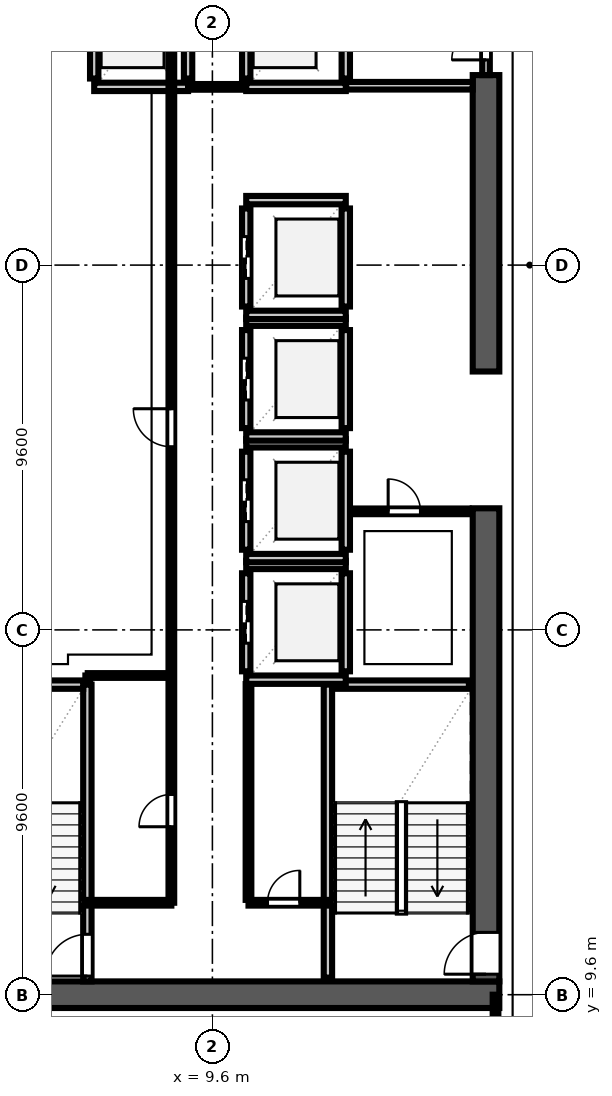
"""IFC4 building model, lengths in metres.
Left out: names, types, materials, properties, quantities, classifications, styles, units other than length and angle.
Written with IfcOpenShell. Run it as: python <this file> out.ifc"""

import sys

from ifc_helpers import new_model, si_unit, direction, frame, frame_2d, origin, place, context, subcontext, project, spatial, rectangle, extrude, element, fill, save


model = new_model("IFC4")
c1 = context("Model", 3, precision=1e-05, world=origin(), true_north=direction((0.0, 1.0)))
c2 = subcontext(c1, "Body", "Model", "MODEL_VIEW")
j1 = project(units=[si_unit("LENGTHUNIT", "METRE"), si_unit("PLANEANGLEUNIT", "RADIAN")], contexts=[c1])
p1 = place(None, origin())
s1 = spatial("IfcSite", under=j1, at=p1, CompositionType="ELEMENT")
p2 = place(p1, origin())
s2 = spatial("IfcBuilding", under=s1, at=p2, CompositionType="ELEMENT")
p3 = place(p2, frame((0.0, 0.0, 163.6)))
s3 = spatial("IfcBuildingStorey", under=s2, at=p3, CompositionType="ELEMENT", Elevation=163.6)
p4 = place(p3, frame((2.55, 9.6, 0.0), z_axis=(0.0, 0.0, 1.0), x_axis=(1.0, 0.0, 0.0)))
e1 = element("IfcWall", 1, at=p4, inside=s3, PredefinedType="SHEAR", context=c2, shape_type="SweptSolid", body=[
    extrude(rectangle(XDim=14.6, YDim=0.7, at=frame_2d((7.3, 0.0))), origin(), (0.0, 0.0, 1.0), 3.54),
])
p5 = place(p3, frame((16.8, 9.95, 0.0), z_axis=(0.0, 0.0, 1.0), x_axis=(0.0, 1.0, 0.0)))
e2 = element("IfcWall", 2, at=p5, inside=s3, PredefinedType="SHEAR", context=c2, shape_type="SweptSolid", body=[
    extrude(rectangle(XDim=12.45, YDim=0.7, at=frame_2d((6.225, 0.0))), origin(), (0.0, 0.0, 1.0), 3.54),
])
p6 = place(p5, frame((0.19, 0.0, 0.0)))
e3 = element("IfcOpeningElement", 3, at=p6, cuts=e2, PredefinedType="OPENING", context=c2, shape_type="SweptSolid", body=[
    extrude(rectangle(XDim=1.1, YDim=2.2, at=frame_2d((0.55, 1.1))), frame((0.0, 0.362, 0.0), z_axis=(0.0, -1.0, 0.0), x_axis=(1.0, 0.0, 0.0)), (0.0, 0.0, 1.0), 0.724),
])
p7 = place(p3, frame((16.8, 26.0, 0.0), z_axis=(0.0, 0.0, 1.0), x_axis=(0.0, 1.0, 0.0)))
e4 = element("IfcWall", 4, at=p7, inside=s3, PredefinedType="SHEAR", context=c2, shape_type="SweptSolid", body=[
    extrude(rectangle(XDim=7.8, YDim=0.7, at=frame_2d((3.9, 0.0))), origin(), (0.0, 0.0, 1.0), 3.54),
])
p8 = place(p3, frame((6.31, 9.95, 0.0), z_axis=(0.0, 0.0, 1.0), x_axis=(0.0, 1.0, 0.0)))
e5 = element("IfcWall", 5, at=p8, inside=s3, PredefinedType="SOLIDWALL", context=c2, shape_type="SweptSolid", body=[
    extrude(rectangle(XDim=7.81, YDim=0.22, at=frame_2d((3.905, 0.0))), origin(), (0.0, 0.0, 1.0), 3.54),
])
p9 = place(p8, frame((0.14, 0.0, 0.0)))
e6 = element("IfcOpeningElement", 6, at=p9, cuts=e5, PredefinedType="OPENING", context=c2, shape_type="SweptSolid", body=[
    extrude(rectangle(XDim=1.1, YDim=2.2, at=frame_2d((0.55, 1.1))), frame((0.0, 0.122, 0.0), z_axis=(0.0, -1.0, 0.0), x_axis=(1.0, 0.0, 0.0)), (0.0, 0.0, 1.0), 0.244),
])
p10 = place(p3, frame((2.65, 17.76, 0.0), z_axis=(0.0, 0.0, 1.0), x_axis=(1.0, 0.0, 0.0)))
e7 = element("IfcWall", 7, at=p10, inside=s3, PredefinedType="SOLIDWALL", context=c2, shape_type="SweptSolid", body=[
    extrude(rectangle(XDim=3.55, YDim=0.22, at=frame_2d((1.775, 0.0))), origin(), (0.0, 0.0, 1.0), 3.54),
])
p11 = place(p3, frame((12.64, 10.05, 0.0), z_axis=(0.0, 0.0, 1.0), x_axis=(0.0, 1.0, 0.0)))
e8 = element("IfcWall", 8, at=p11, inside=s3, PredefinedType="SOLIDWALL", context=c2, shape_type="SweptSolid", body=[
    extrude(rectangle(XDim=7.71, YDim=0.22, at=frame_2d((3.855, 0.0))), origin(), (0.0, 0.0, 1.0), 3.54),
])
p12 = place(p3, frame((12.75, 17.76, 0.0), z_axis=(0.0, 0.0, 1.0), x_axis=(1.0, 0.0, 0.0)))
e9 = element("IfcWall", 9, at=p12, inside=s3, PredefinedType="SOLIDWALL", context=c2, shape_type="SweptSolid", body=[
    extrude(rectangle(XDim=3.6, YDim=0.22, at=frame_2d((1.8, 0.0))), origin(), (0.0, 0.0, 1.0), 3.54),
])
p13 = place(p3, frame((10.49, 18.11, 0.0), z_axis=(0.0, 0.0, 1.0), x_axis=(0.0, 1.0, 0.0)))
e10 = element("IfcWall", 10, at=p13, inside=s3, PredefinedType="SOLIDWALL", context=c2, shape_type="SweptSolid", body=[
    extrude(rectangle(XDim=2.58, YDim=0.22, at=frame_2d((1.29, 0.0))), origin(), (0.0, 0.0, 1.0), 3.54),
])
p14 = place(p13, frame((0.74, 0.0, 0.0)))
e11 = element("IfcOpeningElement", 11, at=p14, cuts=e10, PredefinedType="OPENING", context=c2, shape_type="SweptSolid", body=[
    extrude(rectangle(XDim=1.1, YDim=2.2, at=frame_2d((0.55, 1.1))), frame((0.0, 0.122, 0.0), z_axis=(0.0, -1.0, 0.0), x_axis=(1.0, 0.0, 0.0)), (0.0, 0.0, 1.0), 0.244),
])
p15 = place(p3, frame((13.11, 18.11, 0.0), z_axis=(0.0, 0.0, 1.0), x_axis=(0.0, 1.0, 0.0)))
e12 = element("IfcWall", 12, at=p15, inside=s3, PredefinedType="SOLIDWALL", context=c2, shape_type="SweptSolid", body=[
    extrude(rectangle(XDim=2.58, YDim=0.22, at=frame_2d((1.29, 0.0))), origin(), (0.0, 0.0, 1.0), 3.54),
])
for number, where, z_axis, x_axis in (
    (13, (10.49, 17.89, 0.0), (0.0, 0.0, 1.0), (1.0, 0.0, 0.0)),
    (14, (10.49, 20.91, 0.0), (0.0, 0.0, 1.0), (1.0, 0.0, 0.0)),
):
    element("IfcWall", number, at=place(p3, frame(where, z_axis=z_axis, x_axis=x_axis)), inside=s3, PredefinedType="SOLIDWALL", context=c2, shape_type="SweptSolid", body=[
        extrude(rectangle(XDim=2.62, YDim=0.22, at=frame_2d((1.31, 0.0))), origin(), (0.0, 0.0, 1.0), 3.54),
    ])
p16 = place(p3, frame((10.49, 21.31, 0.0), z_axis=(0.0, 0.0, 1.0), x_axis=(0.0, 1.0, 0.0)))
e15 = element("IfcWall", 15, at=p16, inside=s3, PredefinedType="SOLIDWALL", context=c2, shape_type="SweptSolid", body=[
    extrude(rectangle(XDim=2.58, YDim=0.22, at=frame_2d((1.29, 0.0))), origin(), (0.0, 0.0, 1.0), 3.54),
])
p17 = place(p16, frame((0.74, 0.0, 0.0)))
e16 = element("IfcOpeningElement", 16, at=p17, cuts=e15, PredefinedType="OPENING", context=c2, shape_type="SweptSolid", body=[
    extrude(rectangle(XDim=1.1, YDim=2.2, at=frame_2d((0.55, 1.1))), frame((0.0, 0.122, 0.0), z_axis=(0.0, -1.0, 0.0), x_axis=(1.0, 0.0, 0.0)), (0.0, 0.0, 1.0), 0.244),
])
p18 = place(p3, frame((13.11, 21.31, 0.0), z_axis=(0.0, 0.0, 1.0), x_axis=(0.0, 1.0, 0.0)))
e17 = element("IfcWall", 17, at=p18, inside=s3, PredefinedType="SOLIDWALL", context=c2, shape_type="SweptSolid", body=[
    extrude(rectangle(XDim=2.58, YDim=0.22, at=frame_2d((1.29, 0.0))), origin(), (0.0, 0.0, 1.0), 3.54),
])
for number, where, z_axis, x_axis in (
    (18, (10.49, 21.09, 0.0), (0.0, 0.0, 1.0), (1.0, 0.0, 0.0)),
    (19, (10.49, 24.11, 0.0), (0.0, 0.0, 1.0), (1.0, 0.0, 0.0)),
):
    element("IfcWall", number, at=place(p3, frame(where, z_axis=z_axis, x_axis=x_axis)), inside=s3, PredefinedType="SOLIDWALL", context=c2, shape_type="SweptSolid", body=[
        extrude(rectangle(XDim=2.62, YDim=0.22, at=frame_2d((1.31, 0.0))), origin(), (0.0, 0.0, 1.0), 3.54),
    ])
p19 = place(p3, frame((10.49, 24.51, 0.0), z_axis=(0.0, 0.0, 1.0), x_axis=(0.0, 1.0, 0.0)))
e20 = element("IfcWall", 20, at=p19, inside=s3, PredefinedType="SOLIDWALL", context=c2, shape_type="SweptSolid", body=[
    extrude(rectangle(XDim=2.58, YDim=0.22, at=frame_2d((1.29, 0.0))), origin(), (0.0, 0.0, 1.0), 3.54),
])
p20 = place(p19, frame((0.74, 0.0, 0.0)))
e21 = element("IfcOpeningElement", 21, at=p20, cuts=e20, PredefinedType="OPENING", context=c2, shape_type="SweptSolid", body=[
    extrude(rectangle(XDim=1.1, YDim=2.2, at=frame_2d((0.55, 1.1))), frame((0.0, 0.122, 0.0), z_axis=(0.0, -1.0, 0.0), x_axis=(1.0, 0.0, 0.0)), (0.0, 0.0, 1.0), 0.244),
])
p21 = place(p3, frame((13.11, 24.51, 0.0), z_axis=(0.0, 0.0, 1.0), x_axis=(0.0, 1.0, 0.0)))
e22 = element("IfcWall", 22, at=p21, inside=s3, PredefinedType="SOLIDWALL", context=c2, shape_type="SweptSolid", body=[
    extrude(rectangle(XDim=2.58, YDim=0.22, at=frame_2d((1.29, 0.0))), origin(), (0.0, 0.0, 1.0), 3.54),
])
for number, where, z_axis, x_axis in (
    (23, (10.49, 24.29, 0.0), (0.0, 0.0, 1.0), (1.0, 0.0, 0.0)),
    (24, (10.49, 27.31, 0.0), (0.0, 0.0, 1.0), (1.0, 0.0, 0.0)),
):
    element("IfcWall", number, at=place(p3, frame(where, z_axis=z_axis, x_axis=x_axis)), inside=s3, PredefinedType="SOLIDWALL", context=c2, shape_type="SweptSolid", body=[
        extrude(rectangle(XDim=2.62, YDim=0.22, at=frame_2d((1.31, 0.0))), origin(), (0.0, 0.0, 1.0), 3.54),
    ])
p22 = place(p3, frame((10.49, 27.71, 0.0), z_axis=(0.0, 0.0, 1.0), x_axis=(0.0, 1.0, 0.0)))
e25 = element("IfcWall", 25, at=p22, inside=s3, PredefinedType="SOLIDWALL", context=c2, shape_type="SweptSolid", body=[
    extrude(rectangle(XDim=2.58, YDim=0.22, at=frame_2d((1.29, 0.0))), origin(), (0.0, 0.0, 1.0), 3.54),
])
p23 = place(p22, frame((0.74, 0.0, 0.0)))
e26 = element("IfcOpeningElement", 26, at=p23, cuts=e25, PredefinedType="OPENING", context=c2, shape_type="SweptSolid", body=[
    extrude(rectangle(XDim=1.1, YDim=2.2, at=frame_2d((0.55, 1.1))), frame((0.0, 0.122, 0.0), z_axis=(0.0, -1.0, 0.0), x_axis=(1.0, 0.0, 0.0)), (0.0, 0.0, 1.0), 0.244),
])
p24 = place(p3, frame((13.11, 27.71, 0.0), z_axis=(0.0, 0.0, 1.0), x_axis=(0.0, 1.0, 0.0)))
e27 = element("IfcWall", 27, at=p24, inside=s3, PredefinedType="SOLIDWALL", context=c2, shape_type="SweptSolid", body=[
    extrude(rectangle(XDim=2.58, YDim=0.22, at=frame_2d((1.29, 0.0))), origin(), (0.0, 0.0, 1.0), 3.54),
])
for number, where, z_axis, x_axis in (
    (28, (10.49, 27.49, 0.0), (0.0, 0.0, 1.0), (1.0, 0.0, 0.0)),
    (29, (10.49, 30.51, 0.0), (0.0, 0.0, 1.0), (1.0, 0.0, 0.0)),
):
    element("IfcWall", number, at=place(p3, frame(where, z_axis=z_axis, x_axis=x_axis)), inside=s3, PredefinedType="SOLIDWALL", context=c2, shape_type="SweptSolid", body=[
        extrude(rectangle(XDim=2.62, YDim=0.22, at=frame_2d((1.31, 0.0))), origin(), (0.0, 0.0, 1.0), 3.54),
    ])
for number, where, z_axis, x_axis in (
    (30, (6.49, 33.71, 0.0), (0.0, 0.0, 1.0), (0.0, 1.0, 0.0)),
    (31, (8.96, 33.71, 0.0), (0.0, 0.0, 1.0), (0.0, 1.0, 0.0)),
):
    element("IfcWall", number, at=place(p3, frame(where, z_axis=z_axis, x_axis=x_axis)), inside=s3, PredefinedType="SOLIDWALL", context=c2, shape_type="SweptSolid", body=[
        extrude(rectangle(XDim=2.78, YDim=0.22, at=frame_2d((1.39, 0.0))), origin(), (0.0, 0.0, 1.0), 3.54),
    ])
p25 = place(p3, frame((6.49, 33.49, 0.0), z_axis=(0.0, 0.0, 1.0), x_axis=(1.0, 0.0, 0.0)))
e32 = element("IfcWall", 32, at=p25, inside=s3, PredefinedType="SOLIDWALL", context=c2, shape_type="SweptSolid", body=[
    extrude(rectangle(XDim=2.47, YDim=0.22, at=frame_2d((1.235, 0.0))), origin(), (0.0, 0.0, 1.0), 3.54),
])
for number, where, z_axis, x_axis in (
    (33, (10.49, 33.71, 0.0), (0.0, 0.0, 1.0), (0.0, 1.0, 0.0)),
    (34, (13.11, 33.71, 0.0), (0.0, 0.0, 1.0), (0.0, 1.0, 0.0)),
):
    element("IfcWall", number, at=place(p3, frame(where, z_axis=z_axis, x_axis=x_axis)), inside=s3, PredefinedType="SOLIDWALL", context=c2, shape_type="SweptSolid", body=[
        extrude(rectangle(XDim=2.78, YDim=0.22, at=frame_2d((1.39, 0.0))), origin(), (0.0, 0.0, 1.0), 3.54),
    ])
p26 = place(p3, frame((10.49, 33.49, 0.0), z_axis=(0.0, 0.0, 1.0), x_axis=(1.0, 0.0, 0.0)))
e35 = element("IfcWall", 35, at=p26, inside=s3, PredefinedType="SOLIDWALL", context=c2, shape_type="SweptSolid", body=[
    extrude(rectangle(XDim=2.62, YDim=0.22, at=frame_2d((1.31, 0.0))), origin(), (0.0, 0.0, 1.0), 3.54),
])
p27 = place(p3, frame((13.12, 33.52, 0.0), z_axis=(0.0, 0.0, 1.0), x_axis=(1.0, 0.0, 0.0)))
e36 = element("IfcWall", 36, at=p27, inside=s3, PredefinedType="SOLIDWALL", context=c2, shape_type="SweptSolid", body=[
    extrude(rectangle(XDim=3.33, YDim=0.2, at=frame_2d((1.665, 0.0))), origin(), (0.0, 0.0, 1.0), 3.54),
])
p28 = place(p3, frame((16.8, 33.8, 0.0), z_axis=(0.0, 0.0, 1.0), x_axis=(0.0, 1.0, 0.0)))
e37 = element("IfcWall", 37, at=p28, inside=s3, PredefinedType="SOLIDWALL", context=c2, shape_type="SweptSolid", body=[
    extrude(rectangle(XDim=2.6, YDim=0.2, at=frame_2d((1.3, 0.0))), origin(), (0.0, 0.0, 1.0), 3.54),
])
p29 = place(p28, frame((0.4, 0.0, 0.0)))
e38 = element("IfcOpeningElement", 38, at=p29, cuts=e37, PredefinedType="OPENING", context=c2, shape_type="SweptSolid", body=[
    extrude(rectangle(XDim=1.8, YDim=2.2, at=frame_2d((0.9, 1.1))), frame((0.0, 0.112, 0.0), z_axis=(0.0, -1.0, 0.0), x_axis=(1.0, 0.0, 0.0)), (0.0, 0.0, 1.0), 0.224),
])
p30 = place(p3, frame((8.965, 33.49, 0.0), z_axis=(0.0, 0.0, 1.0), x_axis=(1.0, 0.0, 0.0)))
e39 = element("IfcWall", 39, at=p30, inside=s3, PredefinedType="PARTITIONING", context=c2, shape_type="SweptSolid", body=[
    extrude(rectangle(XDim=1.52, YDim=0.15, at=frame_2d((0.76, 0.0))), origin(), (0.0, 0.0, 1.0), 3.54),
])
p31 = place(p3, frame((10.55, 12.02, 0.0), z_axis=(0.0, 0.0, 1.0), x_axis=(1.0, 0.0, 0.0)))
e40 = element("IfcWall", 40, at=p31, inside=s3, PredefinedType="PARTITIONING", context=c2, shape_type="SweptSolid", body=[
    extrude(rectangle(XDim=2.08, YDim=0.15, at=frame_2d((1.04, 0.0))), origin(), (0.0, 0.0, 1.0), 3.54),
])
p32 = place(p31, frame((0.5, 0.0, 0.0)))
e41 = element("IfcOpeningElement", 41, at=p32, cuts=e40, PredefinedType="OPENING", context=c2, shape_type="SweptSolid", body=[
    extrude(rectangle(XDim=0.85, YDim=2.1, at=frame_2d((0.425, 1.05))), frame((0.0, 0.087, 0.0), z_axis=(0.0, -1.0, 0.0), x_axis=(1.0, 0.0, 0.0)), (0.0, 0.0, 1.0), 0.174),
])
p33 = place(p3, frame((10.55, 12.095, 0.0), z_axis=(0.0, 0.0, 1.0), x_axis=(0.0, 1.0, 0.0)))
e42 = element("IfcWall", 42, at=p33, inside=s3, PredefinedType="PARTITIONING", context=c2, shape_type="SweptSolid", body=[
    extrude(rectangle(XDim=5.68, YDim=0.15, at=frame_2d((2.84, 0.0))), origin(), (0.0, 0.0, 1.0), 3.54),
])
p34 = place(p3, frame((13.225, 22.32, 0.0), z_axis=(0.0, 0.0, 1.0), x_axis=(1.0, 0.0, 0.0)))
e43 = element("IfcWall", 43, at=p34, inside=s3, PredefinedType="PARTITIONING", context=c2, shape_type="SweptSolid", body=[
    extrude(rectangle(XDim=3.12, YDim=0.15, at=frame_2d((1.56, 0.0))), origin(), (0.0, 0.0, 1.0), 3.54),
])
p35 = place(p34, frame((1.0, 0.0, 0.0)))
e44 = element("IfcOpeningElement", 44, at=p35, cuts=e43, PredefinedType="OPENING", context=c2, shape_type="SweptSolid", body=[
    extrude(rectangle(XDim=0.85, YDim=2.1, at=frame_2d((0.425, 1.05))), frame((0.0, 0.087, 0.0), z_axis=(0.0, -1.0, 0.0), x_axis=(1.0, 0.0, 0.0)), (0.0, 0.0, 1.0), 0.174),
])
p36 = place(p3, frame((6.32, 12.02, 0.0), z_axis=(0.0, 0.0, 1.0), x_axis=(1.0, 0.0, 0.0)))
e45 = element("IfcWall", 45, at=p36, inside=s3, PredefinedType="PARTITIONING", context=c2, shape_type="SweptSolid", body=[
    extrude(rectangle(XDim=2.2, YDim=0.15, at=frame_2d((1.1, 0.0))), origin(), (0.0, 0.0, 1.0), 3.54),
])
p37 = place(p3, frame((6.32, 17.8, 0.0), z_axis=(0.0, 0.0, 1.0), x_axis=(0.0, 1.0, 0.0)))
e46 = element("IfcWall", 46, at=p37, inside=s3, PredefinedType="PARTITIONING", context=c2, shape_type="SweptSolid", body=[
    extrude(rectangle(XDim=0.2, YDim=0.125, at=frame_2d((0.1, 0.0))), origin(), (0.0, 0.0, 1.0), 3.54),
])
p38 = place(p3, frame((6.32, 18.0, 0.0), z_axis=(0.0, 0.0, 1.0), x_axis=(1.0, 0.0, 0.0)))
e47 = element("IfcWall", 47, at=p38, inside=s3, PredefinedType="PARTITIONING", context=c2, shape_type="SweptSolid", body=[
    extrude(rectangle(XDim=2.2, YDim=0.125, at=frame_2d((1.1, 0.0))), origin(), (0.0, 0.0, 1.0), 3.54),
])
p39 = place(p3, frame((8.52, 12.02, 0.0), z_axis=(0.0, 0.0, 1.0), x_axis=(0.0, 1.0, 0.0)))
e48 = element("IfcWall", 48, at=p39, inside=s3, PredefinedType="PARTITIONING", context=c2, shape_type="SweptSolid", body=[
    extrude(rectangle(XDim=24.76, YDim=0.15, at=frame_2d((12.38, 0.0))), origin(), (0.0, 0.0, 1.0), 3.54),
])
p40 = place(p39, frame((2.0, 0.0, 0.0)))
e49 = element("IfcOpeningElement", 49, at=p40, cuts=e48, PredefinedType="OPENING", context=c2, shape_type="SweptSolid", body=[
    extrude(rectangle(XDim=0.85, YDim=2.1, at=frame_2d((0.425, 1.05))), frame((0.0, 0.087, 0.0), z_axis=(0.0, -1.0, 0.0), x_axis=(1.0, 0.0, 0.0)), (0.0, 0.0, 1.0), 0.174),
])
p41 = place(p39, frame((12.0, 0.0, 0.0)))
e50 = element("IfcOpeningElement", 50, at=p41, cuts=e48, PredefinedType="OPENING", context=c2, shape_type="SweptSolid", body=[
    extrude(rectangle(XDim=1.0, YDim=2.2, at=frame_2d((0.5, 1.1))), frame((0.0, 0.087, 0.0), z_axis=(0.0, -1.0, 0.0), x_axis=(1.0, 0.0, 0.0)), (0.0, 0.0, 1.0), 0.174),
])
p42 = place(p3, frame((17.05, 0.22, 0.0), z_axis=(0.0, 0.0, 1.0), x_axis=(0.0, 1.0, 0.0)))
e51 = element("IfcWall", 51, at=p42, inside=s3, PredefinedType="PARTITIONING", context=c2, shape_type="SweptSolid", body=[
    extrude(rectangle(XDim=9.38, YDim=0.15, at=frame_2d((4.69, 0.0))), origin(), (0.0, 0.0, 1.0), 3.54),
])
p43 = place(p42, frame((5.58, 0.0, 0.0)))
e52 = element("IfcOpeningElement", 52, at=p43, cuts=e51, PredefinedType="OPENING", context=c2, shape_type="SweptSolid", body=[
    extrude(rectangle(XDim=2.0, YDim=2.3, at=frame_2d((1.0, 1.15))), frame((0.0, 0.087, 0.0), z_axis=(0.0, -1.0, 0.0), x_axis=(1.0, 0.0, 0.0)), (0.0, 0.0, 1.0), 0.174),
])
p44 = place(p9, origin())
e53 = element("IfcDoor", 53, at=p44, inside=s3, OperationType="SINGLE_SWING_LEFT", PredefinedType="DOOR", context=c2, shape_type="SweptSolid", body=[
    extrude(rectangle(XDim=1.1, YDim=2.2, at=frame_2d((0.55, 1.1))), frame((0.0, 0.025, 0.0), z_axis=(0.0, -1.0, 0.0), x_axis=(1.0, 0.0, 0.0)), (0.0, 0.0, 1.0), 0.05),
])
fill(e6, e53)
p45 = place(p6, origin())
e54 = element("IfcDoor", 54, at=p45, inside=s3, OperationType="SINGLE_SWING_LEFT", PredefinedType="DOOR", context=c2, shape_type="SweptSolid", body=[
    extrude(rectangle(XDim=1.1, YDim=2.2, at=frame_2d((0.55, 1.1))), frame((0.0, 0.025, 0.0), z_axis=(0.0, -1.0, 0.0), x_axis=(1.0, 0.0, 0.0)), (0.0, 0.0, 1.0), 0.05),
])
fill(e3, e54)
p46 = place(p14, origin())
e55 = element("IfcDoor", 55, at=p46, inside=s3, OperationType="DOUBLE_DOOR_SLIDING", PredefinedType="DOOR", context=c2, shape_type="SweptSolid", body=[
    extrude(rectangle(XDim=1.1, YDim=2.2, at=frame_2d((0.55, 1.1))), frame((0.0, 0.025, 0.0), z_axis=(0.0, -1.0, 0.0), x_axis=(1.0, 0.0, 0.0)), (0.0, 0.0, 1.0), 0.05),
])
fill(e11, e55)
p47 = place(p17, origin())
e56 = element("IfcDoor", 56, at=p47, inside=s3, OperationType="DOUBLE_DOOR_SLIDING", PredefinedType="DOOR", context=c2, shape_type="SweptSolid", body=[
    extrude(rectangle(XDim=1.1, YDim=2.2, at=frame_2d((0.55, 1.1))), frame((0.0, 0.025, 0.0), z_axis=(0.0, -1.0, 0.0), x_axis=(1.0, 0.0, 0.0)), (0.0, 0.0, 1.0), 0.05),
])
fill(e16, e56)
p48 = place(p20, origin())
e57 = element("IfcDoor", 57, at=p48, inside=s3, OperationType="DOUBLE_DOOR_SLIDING", PredefinedType="DOOR", context=c2, shape_type="SweptSolid", body=[
    extrude(rectangle(XDim=1.1, YDim=2.2, at=frame_2d((0.55, 1.1))), frame((0.0, 0.025, 0.0), z_axis=(0.0, -1.0, 0.0), x_axis=(1.0, 0.0, 0.0)), (0.0, 0.0, 1.0), 0.05),
])
fill(e21, e57)
p49 = place(p23, origin())
e58 = element("IfcDoor", 58, at=p49, inside=s3, OperationType="DOUBLE_DOOR_SLIDING", PredefinedType="DOOR", context=c2, shape_type="SweptSolid", body=[
    extrude(rectangle(XDim=1.1, YDim=2.2, at=frame_2d((0.55, 1.1))), frame((0.0, 0.025, 0.0), z_axis=(0.0, -1.0, 0.0), x_axis=(1.0, 0.0, 0.0)), (0.0, 0.0, 1.0), 0.05),
])
fill(e26, e58)
p50 = place(p29, origin())
e59 = element("IfcDoor", 59, at=p50, inside=s3, OperationType="DOUBLE_DOOR_SINGLE_SWING", PredefinedType="DOOR", context=c2, shape_type="SweptSolid", body=[
    extrude(rectangle(XDim=1.8, YDim=2.2, at=frame_2d((0.9, 1.1))), frame((0.0, 0.025, 0.0), z_axis=(0.0, -1.0, 0.0), x_axis=(1.0, 0.0, 0.0)), (0.0, 0.0, 1.0), 0.05),
])
fill(e38, e59)
p51 = place(p32, origin())
e60 = element("IfcDoor", 60, at=p51, inside=s3, OperationType="SINGLE_SWING_RIGHT", PredefinedType="DOOR", context=c2, shape_type="SweptSolid", body=[
    extrude(rectangle(XDim=0.85, YDim=2.1, at=frame_2d((0.425, 1.05))), frame((0.0, 0.025, 0.0), z_axis=(0.0, -1.0, 0.0), x_axis=(1.0, 0.0, 0.0)), (0.0, 0.0, 1.0), 0.05),
])
fill(e41, e60)
p52 = place(p35, origin())
e61 = element("IfcDoor", 61, at=p52, inside=s3, OperationType="SINGLE_SWING_LEFT", PredefinedType="DOOR", context=c2, shape_type="SweptSolid", body=[
    extrude(rectangle(XDim=0.85, YDim=2.1, at=frame_2d((0.425, 1.05))), frame((0.0, 0.025, 0.0), z_axis=(0.0, -1.0, 0.0), x_axis=(1.0, 0.0, 0.0)), (0.0, 0.0, 1.0), 0.05),
])
fill(e44, e61)
p53 = place(p40, origin())
e62 = element("IfcDoor", 62, at=p53, inside=s3, OperationType="SINGLE_SWING_LEFT", PredefinedType="DOOR", context=c2, shape_type="SweptSolid", body=[
    extrude(rectangle(XDim=0.85, YDim=2.1, at=frame_2d((0.425, 1.05))), frame((0.0, 0.025, 0.0), z_axis=(0.0, -1.0, 0.0), x_axis=(1.0, 0.0, 0.0)), (0.0, 0.0, 1.0), 0.05),
])
fill(e49, e62)
p54 = place(p41, origin())
e63 = element("IfcDoor", 63, at=p54, inside=s3, OperationType="SINGLE_SWING_RIGHT", PredefinedType="DOOR", context=c2, shape_type="SweptSolid", body=[
    extrude(rectangle(XDim=1.0, YDim=2.2, at=frame_2d((0.5, 1.1))), frame((0.0, 0.025, 0.0), z_axis=(0.0, -1.0, 0.0), x_axis=(1.0, 0.0, 0.0)), (0.0, 0.0, 1.0), 0.05),
])
fill(e50, e63)
save(model, sys.argv[1])
